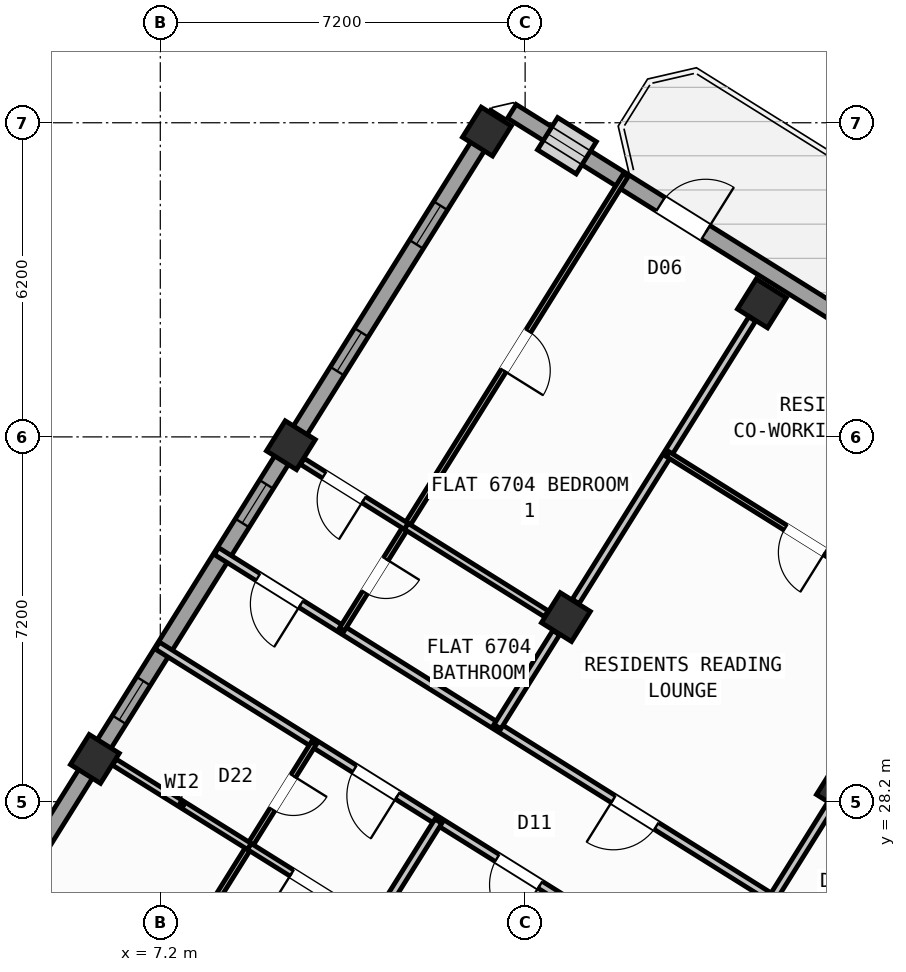
"""IFC4 building model, lengths in metres.
Left out: names, types, materials, properties, quantities, classifications, styles, units other than length and angle.
Written with IfcOpenShell. Run it as: python <this file> out.ifc"""

import sys

from ifc_helpers import new_model, si_unit, direction, frame, frame_2d, origin, origin_2d, place, context, subcontext, project, spatial, rectangle, hollow_rectangle, extrude, source, transform, mapped, element, fill, save


model = new_model("IFC4")
c1 = context("Model", 3, precision=1e-05, world=origin(), true_north=direction((0.0, 1.0)))
c2 = subcontext(c1, "Body", "Model", "MODEL_VIEW")
j1 = project(units=[si_unit("LENGTHUNIT", "METRE"), si_unit("PLANEANGLEUNIT", "RADIAN")], contexts=[c1])
p1 = place(None, origin())
s1 = spatial("IfcSite", under=j1, at=p1, CompositionType="ELEMENT")
p2 = place(p1, origin())
s2 = spatial("IfcBuilding", under=s1, at=p2, CompositionType="ELEMENT")
p3 = place(p2, frame((0.0, 0.0, 266.4)))
s3 = spatial("IfcBuildingStorey", under=s2, at=p3, CompositionType="ELEMENT", Elevation=266.4)
m1 = source(origin(), c2, "Body", "SweptSolid", [
    extrude(hollow_rectangle(XDim=0.7, YDim=0.7, WallThickness=0.028, at=origin_2d()), origin(), (0.0, 0.0, 1.0), 3.6),
])
for number, where, z_axis, x_axis in (
    (1, (20.632, 28.452, 0.0), (0.0, 0.0, 1.0), (-0.848, 0.53, 0.0)),
    (2, (19.073, 38.034, 0.0), (0.0, 0.0, 1.0), (-0.848, 0.53, 0.0)),
    (3, (15.205, 31.844, 0.0), (0.0, 0.0, 1.0), (-0.848, 0.53, 0.0)),
    (4, (13.646, 41.426, 0.0), (0.0, 0.0, 1.0), (-0.848, 0.53, 0.0)),
    (5, (9.777, 35.235, 0.0), (0.0, 0.0, 1.0), (-0.848, 0.53, 0.0)),
    (6, (5.909, 29.044, 0.0), (0.0, 0.0, 1.0), (-0.848, 0.53, 0.0)),
):
    element("IfcColumn", number, at=place(p3, frame(where, z_axis=z_axis, x_axis=x_axis)), inside=s3, PredefinedType="COLUMN", context=c2, shape_type="MappedRepresentation", body=[
        mapped(m1, transform((0.0, 0.0, 0.0), scale=1.0)),
    ])
p4 = place(p3, frame((2.415, 23.452, 0.0), z_axis=(0.0, 0.0, 1.0), x_axis=(0.52991049553, 0.848053575387, 0.0)))
e7 = element("IfcWall", 7, at=p4, inside=s3, PredefinedType="STANDARD", context=c2, shape_type="SweptSolid", body=[
    extrude(rectangle(XDim=21.587, YDim=0.32, at=frame_2d((10.794, 0.0))), origin(), (0.0, 0.0, 1.0), 2.875),
])
p5 = place(p4, frame((2.606, 0.0, 0.9)))
e8 = element("IfcOpeningElement", 8, at=p5, cuts=e7, PredefinedType="OPENING", context=c2, shape_type="SweptSolid", body=[
    extrude(rectangle(XDim=1.65, YDim=1.45, at=frame_2d((0.825, 0.725))), frame((0.0, 0.17, 0.0), z_axis=(0.0, -1.0, 0.0), x_axis=(1.0, 0.0, 0.0)), (0.0, 0.0, 1.0), 0.34),
])
p6 = place(p4, frame((7.504, 0.0, 1.0)))
e9 = element("IfcOpeningElement", 9, at=p6, cuts=e7, PredefinedType="OPENING", context=c2, shape_type="SweptSolid", body=[
    extrude(rectangle(XDim=0.9, YDim=1.25, at=frame_2d((0.45, 0.625))), frame((0.0, 0.17, 0.0), z_axis=(0.0, -1.0, 0.0), x_axis=(1.0, 0.0, 0.0)), (0.0, 0.0, 1.0), 0.34),
])
p7 = place(p4, frame((12.084, 0.0, 1.0)))
e10 = element("IfcOpeningElement", 10, at=p7, cuts=e7, PredefinedType="OPENING", context=c2, shape_type="SweptSolid", body=[
    extrude(rectangle(XDim=0.9, YDim=1.25, at=frame_2d((0.45, 0.625))), frame((0.0, 0.17, 0.0), z_axis=(0.0, -1.0, 0.0), x_axis=(1.0, 0.0, 0.0)), (0.0, 0.0, 1.0), 0.34),
])
p8 = place(p4, frame((15.619, 0.0, 1.0)))
e11 = element("IfcOpeningElement", 11, at=p8, cuts=e7, PredefinedType="OPENING", context=c2, shape_type="SweptSolid", body=[
    extrude(rectangle(XDim=0.9, YDim=1.25, at=frame_2d((0.45, 0.625))), frame((0.0, 0.17, 0.0), z_axis=(0.0, -1.0, 0.0), x_axis=(1.0, 0.0, 0.0)), (0.0, 0.0, 1.0), 0.34),
])
p9 = place(p4, frame((18.569, 0.0, 1.0)))
e12 = element("IfcOpeningElement", 12, at=p9, cuts=e7, PredefinedType="OPENING", context=c2, shape_type="SweptSolid", body=[
    extrude(rectangle(XDim=0.9, YDim=1.25, at=frame_2d((0.45, 0.625))), frame((0.0, 0.17, 0.0), z_axis=(0.0, -1.0, 0.0), x_axis=(1.0, 0.0, 0.0)), (0.0, 0.0, 1.0), 0.34),
])
p10 = place(p3, frame((14.138, 41.825, 0.0), z_axis=(0.0, 0.0, 1.0), x_axis=(0.848046498049, -0.529921821731, 0.0)))
e13 = element("IfcWall", 13, at=p10, inside=s3, PredefinedType="STANDARD", context=c2, shape_type="SweptSolid", body=[
    extrude(rectangle(XDim=31.588, YDim=0.32, at=frame_2d((15.794, 0.0))), origin(), (0.0, 0.0, 1.0), 3.35),
])
p11 = place(p10, frame((3.46, 0.0, 0.0)))
e14 = element("IfcOpeningElement", 14, at=p11, cuts=e13, PredefinedType="OPENING", context=c2, shape_type="SweptSolid", body=[
    extrude(rectangle(XDim=1.05, YDim=2.15, at=frame_2d((0.525, 1.075))), frame((0.0, 0.17, 0.0), z_axis=(0.0, -1.0, 0.0), x_axis=(1.0, 0.0, 0.0)), (0.0, 0.0, 1.0), 0.34),
])
p12 = place(p10, frame((0.831, 0.0, 1.0)))
e15 = element("IfcOpeningElement", 15, at=p12, cuts=e13, PredefinedType="OPENING", context=c2, shape_type="SweptSolid", body=[
    extrude(rectangle(XDim=0.9, YDim=1.25, at=frame_2d((0.45, 0.625))), frame((0.0, 0.17, 0.0), z_axis=(0.0, -1.0, 0.0), x_axis=(1.0, 0.0, 0.0)), (0.0, 0.0, 1.0), 0.34),
])
p13 = place(p10, frame((8.719, 0.0, 0.9)))
e16 = element("IfcOpeningElement", 16, at=p13, cuts=e13, PredefinedType="OPENING", context=c2, shape_type="SweptSolid", body=[
    extrude(rectangle(XDim=1.35, YDim=1.45, at=frame_2d((0.675, 0.725))), frame((0.0, 0.17, 0.0), z_axis=(0.0, -1.0, 0.0), x_axis=(1.0, 0.0, 0.0)), (0.0, 0.0, 1.0), 0.34),
])
p14 = place(p10, frame((13.599, 0.0, 0.95)))
e17 = element("IfcOpeningElement", 17, at=p14, cuts=e13, PredefinedType="OPENING", context=c2, shape_type="SweptSolid", body=[
    extrude(rectangle(XDim=1.95, YDim=1.35, at=frame_2d((0.975, 0.675))), frame((0.0, 0.17, 0.0), z_axis=(0.0, -1.0, 0.0), x_axis=(1.0, 0.0, 0.0)), (0.0, 0.0, 1.0), 0.34),
])
p15 = place(p10, frame((17.154, 0.0, 1.0)))
e18 = element("IfcOpeningElement", 18, at=p15, cuts=e13, PredefinedType="OPENING", context=c2, shape_type="SweptSolid", body=[
    extrude(rectangle(XDim=0.9, YDim=1.25, at=frame_2d((0.45, 0.625))), frame((0.0, 0.17, 0.0), z_axis=(0.0, -1.0, 0.0), x_axis=(1.0, 0.0, 0.0)), (0.0, 0.0, 1.0), 0.34),
])
p16 = place(p10, frame((21.719, 0.0, 0.9)))
e19 = element("IfcOpeningElement", 19, at=p16, cuts=e13, PredefinedType="OPENING", context=c2, shape_type="SweptSolid", body=[
    extrude(rectangle(XDim=1.65, YDim=1.45, at=frame_2d((0.825, 0.725))), frame((0.0, 0.17, 0.0), z_axis=(0.0, -1.0, 0.0), x_axis=(1.0, 0.0, 0.0)), (0.0, 0.0, 1.0), 0.34),
])
p17 = place(p10, frame((27.419, 0.0, 0.9)))
e20 = element("IfcOpeningElement", 20, at=p17, cuts=e13, PredefinedType="OPENING", context=c2, shape_type="SweptSolid", body=[
    extrude(rectangle(XDim=1.65, YDim=1.45, at=frame_2d((0.825, 0.725))), frame((0.0, 0.17, 0.0), z_axis=(0.0, -1.0, 0.0), x_axis=(1.0, 0.0, 0.0)), (0.0, 0.0, 1.0), 0.34),
])
p18 = place(p3, frame((22.495, 24.281, 0.0), z_axis=(0.0, 0.0, 1.0), x_axis=(-0.848052408131, 0.529912363569, 0.0)))
e21 = element("IfcWall", 21, at=p18, inside=s3, PredefinedType="PARTITIONING", context=c2, shape_type="SweptSolid", body=[
    extrude(rectangle(XDim=16.73, YDim=0.16, at=frame_2d((8.365, 0.0))), origin(), (0.0, 0.0, 1.0), 3.34),
])
p19 = place(p18, frame((2.22, 0.0, 0.0)))
e22 = element("IfcOpeningElement", 22, at=p19, cuts=e21, PredefinedType="OPENING", context=c2, shape_type="SweptSolid", body=[
    extrude(rectangle(XDim=0.86, YDim=2.05, at=frame_2d((0.43, 1.025))), frame((0.0, 0.09, 0.0), z_axis=(0.0, -1.0, 0.0), x_axis=(1.0, 0.0, 0.0)), (0.0, 0.0, 1.0), 0.18),
])
p20 = place(p18, frame((6.49, 0.0, 0.0)))
e23 = element("IfcOpeningElement", 23, at=p20, cuts=e21, PredefinedType="OPENING", context=c2, shape_type="SweptSolid", body=[
    extrude(rectangle(XDim=1.0, YDim=2.1, at=frame_2d((0.5, 1.05))), frame((0.0, 0.09, 0.0), z_axis=(0.0, -1.0, 0.0), x_axis=(1.0, 0.0, 0.0)), (0.0, 0.0, 1.0), 0.18),
])
p21 = place(p18, frame((14.76, 0.0, 0.0)))
e24 = element("IfcOpeningElement", 24, at=p21, cuts=e21, PredefinedType="OPENING", context=c2, shape_type="SweptSolid", body=[
    extrude(rectangle(XDim=1.0, YDim=2.1, at=frame_2d((0.5, 1.05))), frame((0.0, 0.09, 0.0), z_axis=(0.0, -1.0, 0.0), x_axis=(1.0, 0.0, 0.0)), (0.0, 0.0, 1.0), 0.18),
])
p22 = place(p3, frame((21.329, 22.416, 0.0), z_axis=(0.0, 0.0, 1.0), x_axis=(-0.848052408131, 0.529912363569, 0.0)))
e25 = element("IfcWall", 25, at=p22, inside=s3, PredefinedType="PARTITIONING", context=c2, shape_type="SweptSolid", body=[
    extrude(rectangle(XDim=16.73, YDim=0.16, at=frame_2d((8.365, 0.0))), origin(), (0.0, 0.0, 1.0), 3.34),
])
p23 = place(p22, frame((1.395, 0.0, 0.0)))
e26 = element("IfcOpeningElement", 26, at=p23, cuts=e25, PredefinedType="OPENING", context=c2, shape_type="SweptSolid", body=[
    extrude(rectangle(XDim=1.0, YDim=2.1, at=frame_2d((0.5, 1.05))), frame((0.0, 0.09, 0.0), z_axis=(0.0, -1.0, 0.0), x_axis=(1.0, 0.0, 0.0)), (0.0, 0.0, 1.0), 0.18),
])
p24 = place(p22, frame((7.82, 0.0, 0.0)))
e27 = element("IfcOpeningElement", 27, at=p24, cuts=e25, PredefinedType="OPENING", context=c2, shape_type="SweptSolid", body=[
    extrude(rectangle(XDim=1.0, YDim=2.1, at=frame_2d((0.5, 1.05))), frame((0.0, 0.09, 0.0), z_axis=(0.0, -1.0, 0.0), x_axis=(1.0, 0.0, 0.0)), (0.0, 0.0, 1.0), 0.18),
])
p25 = place(p22, frame((11.14, 0.0, 0.0)))
e28 = element("IfcOpeningElement", 28, at=p25, cuts=e25, PredefinedType="OPENING", context=c2, shape_type="SweptSolid", body=[
    extrude(rectangle(XDim=1.0, YDim=2.1, at=frame_2d((0.5, 1.05))), frame((0.0, 0.09, 0.0), z_axis=(0.0, -1.0, 0.0), x_axis=(1.0, 0.0, 0.0)), (0.0, 0.0, 1.0), 0.18),
])
p26 = place(p3, frame((12.688, 27.815, 0.0), z_axis=(0.0, 0.0, 1.0), x_axis=(-0.52994879608, -0.848029641896, 0.0)))
e29 = element("IfcWall", 29, at=p26, inside=s3, PredefinedType="PARTITIONING", context=c2, shape_type="SweptSolid", body=[
    extrude(rectangle(XDim=2.188, YDim=0.16, at=frame_2d((1.094, 0.0))), origin(), (0.0, 0.0, 1.0), 2.875),
])
p27 = place(p3, frame((10.228, 29.352, 0.0), z_axis=(0.0, 0.0, 1.0), x_axis=(-0.529917830441, -0.848048992088, 0.0)))
e30 = element("IfcWall", 30, at=p27, inside=s3, PredefinedType="PARTITIONING", context=c2, shape_type="SweptSolid", body=[
    extrude(rectangle(XDim=9.47, YDim=0.11, at=frame_2d((4.735, 0.0))), origin(), (0.0, 0.0, 1.0), 3.34),
])
p28 = place(p27, frame((0.76, 0.0, 0.0)))
e31 = element("IfcOpeningElement", 31, at=p28, cuts=e30, PredefinedType="OPENING", context=c2, shape_type="SweptSolid", body=[
    extrude(rectangle(XDim=0.78, YDim=2.05, at=frame_2d((0.39, 1.025))), frame((0.0, 0.065, 0.0), z_axis=(0.0, -1.0, 0.0), x_axis=(1.0, 0.0, 0.0)), (0.0, 0.0, 1.0), 0.13),
])
p29 = place(p27, frame((5.475, 0.0, 0.0)))
e32 = element("IfcOpeningElement", 32, at=p29, cuts=e30, PredefinedType="OPENING", context=c2, shape_type="SweptSolid", body=[
    extrude(rectangle(XDim=0.92, YDim=2.08, at=frame_2d((0.46, 1.04))), frame((0.0, 0.065, 0.0), z_axis=(0.0, -1.0, 0.0), x_axis=(1.0, 0.0, 0.0)), (0.0, 0.0, 1.0), 0.13),
])
p30 = place(p3, frame((11.109, 25.972, 0.0), z_axis=(0.0, 0.0, 1.0), x_axis=(-0.848041534199, 0.529929765415, 0.0)))
e33 = element("IfcWall", 33, at=p30, inside=s3, PredefinedType="PLUMBINGWALL", context=c2, shape_type="SweptSolid", body=[
    extrude(rectangle(XDim=2.538, YDim=0.14, at=frame_2d((1.269, 0.0))), origin(), (0.0, 0.0, 1.0), 2.875),
])
p31 = place(p30, frame((0.628, 0.0, 0.0)))
e34 = element("IfcOpeningElement", 34, at=p31, cuts=e33, PredefinedType="OPENING", context=c2, shape_type="SweptSolid", body=[
    extrude(rectangle(XDim=0.92, YDim=2.08, at=frame_2d((0.46, 1.04))), frame((0.0, 0.08, 0.0), z_axis=(0.0, -1.0, 0.0), x_axis=(1.0, 0.0, 0.0)), (0.0, 0.0, 1.0), 0.16),
])
p32 = place(p3, frame((8.956, 27.317, 0.0), z_axis=(0.0, 0.0, 1.0), x_axis=(-0.848050751193, 0.529915015264, 0.0)))
e35 = element("IfcWall", 35, at=p32, inside=s3, PredefinedType="PLUMBINGWALL", context=c2, shape_type="SweptSolid", body=[
    extrude(rectangle(XDim=3.138, YDim=0.14, at=frame_2d((1.569, 0.0))), origin(), (0.0, 0.0, 1.0), 2.875),
])
p33 = place(p3, frame((20.44, 28.145, 0.0), z_axis=(0.0, 0.0, 1.0), x_axis=(-0.5299186965, -0.848048450915, 0.0)))
e36 = element("IfcWall", 36, at=p33, inside=s3, PredefinedType="PARTITIONING", context=c2, shape_type="SweptSolid", body=[
    extrude(rectangle(XDim=2.188, YDim=0.16, at=frame_2d((1.094, 0.0))), origin(), (0.0, 0.0, 1.0), 2.875),
])
p34 = place(p3, frame((18.881, 37.727, 0.0), z_axis=(0.0, 0.0, 1.0), x_axis=(-0.529938869374, -0.84803584519, 0.0)))
e37 = element("IfcWall", 37, at=p34, inside=s3, PredefinedType="PARTITIONING", context=c2, shape_type="SweptSolid", body=[
    extrude(rectangle(XDim=6.576, YDim=0.16, at=frame_2d((3.288, 0.0))), origin(), (0.0, 0.0, 1.0), 2.875),
])
p35 = place(p3, frame((15.013, 31.537, 0.0), z_axis=(0.0, 0.0, 1.0), x_axis=(-0.5299186965, -0.848048450915, 0.0)))
e38 = element("IfcWall", 38, at=p35, inside=s3, PredefinedType="PARTITIONING", context=c2, shape_type="SweptSolid", body=[
    extrude(rectangle(XDim=2.188, YDim=0.16, at=frame_2d((1.094, 0.0))), origin(), (0.0, 0.0, 1.0), 2.875),
])
p36 = place(p3, frame((22.642, 31.668, 0.0), z_axis=(0.0, 0.0, 1.0), x_axis=(-0.84806687439, 0.529889211593, 0.0)))
e39 = element("IfcWall", 39, at=p36, inside=s3, PredefinedType="PARTITIONING", context=c2, shape_type="SweptSolid", body=[
    extrude(rectangle(XDim=6.4, YDim=0.11, at=frame_2d((3.2, 0.0))), origin(), (0.0, 0.0, 1.0), 3.34),
])
p37 = place(p36, frame((2.74, 0.0, 0.0)))
e40 = element("IfcOpeningElement", 40, at=p37, cuts=e39, PredefinedType="OPENING", context=c2, shape_type="SweptSolid", body=[
    extrude(rectangle(XDim=0.92, YDim=2.08, at=frame_2d((0.46, 1.04))), frame((0.0, 0.065, 0.0), z_axis=(0.0, -1.0, 0.0), x_axis=(1.0, 0.0, 0.0)), (0.0, 0.0, 1.0), 0.13),
])
p38 = place(p3, frame((16.385, 40.563, 0.0), z_axis=(0.0, 0.0, 1.0), x_axis=(-0.529924195719, -0.848045014602, 0.0)))
e41 = element("IfcWall", 41, at=p38, inside=s3, PredefinedType="PARTITIONING", context=c2, shape_type="SweptSolid", body=[
    extrude(rectangle(XDim=10.57, YDim=0.11, at=frame_2d((5.285, 0.0))), origin(), (0.0, 0.0, 1.0), 3.34),
])
p39 = place(p38, frame((8.93, 0.0, 0.0)))
e42 = element("IfcOpeningElement", 42, at=p39, cuts=e41, PredefinedType="OPENING", context=c2, shape_type="SweptSolid", body=[
    extrude(rectangle(XDim=0.78, YDim=2.05, at=frame_2d((0.39, 1.025))), frame((0.0, 0.065, 0.0), z_axis=(0.0, -1.0, 0.0), x_axis=(1.0, 0.0, 0.0)), (0.0, 0.0, 1.0), 0.13),
])
p40 = place(p38, frame((3.625, 0.0, 0.0)))
e43 = element("IfcOpeningElement", 43, at=p40, cuts=e41, PredefinedType="OPENING", context=c2, shape_type="SweptSolid", body=[
    extrude(rectangle(XDim=0.92, YDim=2.08, at=frame_2d((0.46, 1.04))), frame((0.0, 0.065, 0.0), z_axis=(0.0, -1.0, 0.0), x_axis=(1.0, 0.0, 0.0)), (0.0, 0.0, 1.0), 0.13),
])
p41 = place(p3, frame((12.055, 33.635, 0.0), z_axis=(0.0, 0.0, 1.0), x_axis=(-0.848089044815, 0.529853727046, 0.0)))
e44 = element("IfcWall", 44, at=p41, inside=s3, PredefinedType="PLUMBINGWALL", context=c2, shape_type="SweptSolid", body=[
    extrude(rectangle(XDim=2.418, YDim=0.14, at=frame_2d((1.209, 0.0))), origin(), (0.0, 0.0, 1.0), 2.875),
])
p42 = place(p41, frame((0.99, 0.0, 0.0)))
e45 = element("IfcOpeningElement", 45, at=p42, cuts=e44, PredefinedType="OPENING", context=c2, shape_type="SweptSolid", body=[
    extrude(rectangle(XDim=0.92, YDim=2.08, at=frame_2d((0.46, 1.04))), frame((0.0, 0.08, 0.0), z_axis=(0.0, -1.0, 0.0), x_axis=(1.0, 0.0, 0.0)), (0.0, 0.0, 1.0), 0.16),
])
p43 = place(p3, frame((14.818, 31.908, 0.0), z_axis=(0.0, 0.0, 1.0), x_axis=(-0.848036190178, 0.529938317305, 0.0)))
e46 = element("IfcWall", 46, at=p43, inside=s3, PredefinedType="PLUMBINGWALL", context=c2, shape_type="SweptSolid", body=[
    extrude(rectangle(XDim=3.258, YDim=0.14, at=frame_2d((1.629, 0.0))), origin(), (0.0, 0.0, 1.0), 2.875),
])
m2 = source(origin(), c2, "Body", "SweptSolid", [
    extrude(rectangle(XDim=1.05, YDim=2.15, at=frame_2d((0.525, 1.075))), frame((0.0, 0.025, 0.0), z_axis=(0.0, -1.0, 0.0), x_axis=(1.0, 0.0, 0.0)), (0.0, 0.0, 1.0), 0.05),
])
p44 = place(p11, origin())
e47 = element("IfcDoor", 47, at=p44, inside=s3, OperationType="SINGLE_SWING_RIGHT", PredefinedType="DOOR", context=c2, shape_type="MappedRepresentation", body=[
    mapped(m2, transform((0.0, 0.0, 0.0), scale=1.0)),
])
fill(e14, e47)
m3 = source(origin(), c2, "Body", "SweptSolid", [
    extrude(rectangle(XDim=0.9, YDim=1.25, at=frame_2d((0.45, 0.625))), frame((0.0, 0.03, 0.0), z_axis=(0.0, -1.0, 0.0), x_axis=(1.0, 0.0, 0.0)), (0.0, 0.0, 1.0), 0.06),
])
p45 = place(p6, origin())
e48 = element("IfcWindow", 48, at=p45, inside=s3, PartitioningType="SINGLE_PANEL", PredefinedType="WINDOW", context=c2, shape_type="MappedRepresentation", body=[
    mapped(m3, transform((0.0, 0.0, 0.0), scale=1.0)),
])
fill(e9, e48)
p46 = place(p7, origin())
e49 = element("IfcWindow", 49, at=p46, inside=s3, PartitioningType="SINGLE_PANEL", PredefinedType="WINDOW", context=c2, shape_type="MappedRepresentation", body=[
    mapped(m3, transform((0.0, 0.0, 0.0), scale=1.0)),
])
fill(e10, e49)
p47 = place(p8, origin())
e50 = element("IfcWindow", 50, at=p47, inside=s3, PartitioningType="SINGLE_PANEL", PredefinedType="WINDOW", context=c2, shape_type="MappedRepresentation", body=[
    mapped(m3, transform((0.0, 0.0, 0.0), scale=1.0)),
])
fill(e11, e50)
p48 = place(p9, origin())
e51 = element("IfcWindow", 51, at=p48, inside=s3, PartitioningType="SINGLE_PANEL", PredefinedType="WINDOW", context=c2, shape_type="MappedRepresentation", body=[
    mapped(m3, transform((0.0, 0.0, 0.0), scale=1.0)),
])
fill(e12, e51)
p49 = place(p12, origin())
e52 = element("IfcWindow", 52, at=p49, inside=s3, PartitioningType="SINGLE_PANEL", PredefinedType="WINDOW", context=c2, shape_type="MappedRepresentation", body=[
    mapped(m3, transform((0.0, 0.0, 0.0), scale=1.0)),
])
fill(e15, e52)
m4 = source(origin(), c2, "Body", "SweptSolid", [
    extrude(rectangle(XDim=1.0, YDim=2.1, at=frame_2d((0.5, 1.05))), frame((0.0, 0.025, 0.0), z_axis=(0.0, -1.0, 0.0), x_axis=(1.0, 0.0, 0.0)), (0.0, 0.0, 1.0), 0.05),
])
p50 = place(p24, origin())
e53 = element("IfcDoor", 53, at=p50, inside=s3, OperationType="SINGLE_SWING_LEFT", PredefinedType="DOOR", context=c2, shape_type="MappedRepresentation", body=[
    mapped(m4, transform((0.0, 0.0, 0.0), scale=1.0)),
])
fill(e27, e53)
p51 = place(p25, origin())
e54 = element("IfcDoor", 54, at=p51, inside=s3, OperationType="SINGLE_SWING_LEFT", PredefinedType="DOOR", context=c2, shape_type="MappedRepresentation", body=[
    mapped(m4, transform((0.0, 0.0, 0.0), scale=1.0)),
])
fill(e28, e54)
m5 = source(origin(), c2, "Body", "SweptSolid", [
    extrude(rectangle(XDim=0.92, YDim=2.08, at=frame_2d((0.46, 1.04))), frame((0.0, 0.025, 0.0), z_axis=(0.0, -1.0, 0.0), x_axis=(1.0, 0.0, 0.0)), (0.0, 0.0, 1.0), 0.05),
])
p52 = place(p31, origin())
e55 = element("IfcDoor", 55, at=p52, inside=s3, OperationType="SINGLE_SWING_RIGHT", PredefinedType="DOOR", context=c2, shape_type="MappedRepresentation", body=[
    mapped(m5, transform((0.0, 0.0, 0.0), scale=1.0)),
])
fill(e34, e55)
m6 = source(origin(), c2, "Body", "SweptSolid", [
    extrude(rectangle(XDim=0.78, YDim=2.05, at=frame_2d((0.39, 1.025))), frame((0.0, 0.025, 0.0), z_axis=(0.0, -1.0, 0.0), x_axis=(1.0, 0.0, 0.0)), (0.0, 0.0, 1.0), 0.05),
])
p53 = place(p28, origin())
e56 = element("IfcDoor", 56, at=p53, inside=s3, OperationType="SINGLE_SWING_LEFT", PredefinedType="DOOR", context=c2, shape_type="MappedRepresentation", body=[
    mapped(m6, transform((0.0, 0.0, 0.0), scale=1.0)),
])
fill(e31, e56)
p54 = place(p20, origin())
e57 = element("IfcDoor", 57, at=p54, inside=s3, OperationType="SINGLE_SWING_RIGHT", PredefinedType="DOOR", context=c2, shape_type="MappedRepresentation", body=[
    mapped(m4, transform((0.0, 0.0, 0.0), scale=1.0)),
])
fill(e23, e57)
p55 = place(p37, origin())
e58 = element("IfcDoor", 58, at=p55, inside=s3, OperationType="SINGLE_SWING_LEFT", PredefinedType="DOOR", context=c2, shape_type="MappedRepresentation", body=[
    mapped(m5, transform((0.0, 0.0, 0.0), scale=1.0)),
])
fill(e40, e58)
p56 = place(p21, origin())
e59 = element("IfcDoor", 59, at=p56, inside=s3, OperationType="SINGLE_SWING_LEFT", PredefinedType="DOOR", context=c2, shape_type="MappedRepresentation", body=[
    mapped(m4, transform((0.0, 0.0, 0.0), scale=1.0)),
])
fill(e24, e59)
p57 = place(p42, origin())
e60 = element("IfcDoor", 60, at=p57, inside=s3, OperationType="SINGLE_SWING_LEFT", PredefinedType="DOOR", context=c2, shape_type="MappedRepresentation", body=[
    mapped(m5, transform((0.0, 0.0, 0.0), scale=1.0)),
])
fill(e45, e60)
p58 = place(p39, origin())
e61 = element("IfcDoor", 61, at=p58, inside=s3, OperationType="SINGLE_SWING_LEFT", PredefinedType="DOOR", context=c2, shape_type="MappedRepresentation", body=[
    mapped(m6, transform((0.0, 0.0, 0.0), scale=1.0)),
])
fill(e42, e61)
p59 = place(p40, origin())
e62 = element("IfcDoor", 62, at=p59, inside=s3, OperationType="SINGLE_SWING_RIGHT", PredefinedType="DOOR", context=c2, shape_type="MappedRepresentation", body=[
    mapped(m5, transform((0.0, 0.0, 0.0), scale=1.0)),
])
fill(e43, e62)
save(model, sys.argv[1])
